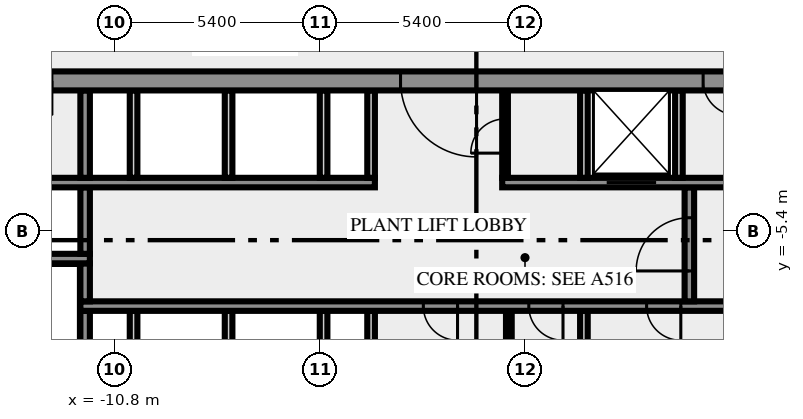
"""IFC4 building model, lengths in metres.
Left out: names, types, materials, properties, quantities, classifications, styles, units other than length and angle.
Written with IfcOpenShell. Run it as: python <this file> out.ifc"""

import sys

from ifc_helpers import new_model, si_unit, direction, frame, frame_2d, origin, place, context, subcontext, project, spatial, rectangle, extrude, element, fill, save


model = new_model("IFC4")
c1 = context("Model", 3, precision=1e-05, world=origin(), true_north=direction((0.0, 1.0)))
c2 = subcontext(c1, "Body", "Model", "MODEL_VIEW")
j1 = project(units=[si_unit("LENGTHUNIT", "METRE"), si_unit("PLANEANGLEUNIT", "RADIAN")], contexts=[c1])
p1 = place(None, origin())
s1 = spatial("IfcSite", under=j1, at=p1, CompositionType="ELEMENT")
p2 = place(p1, origin())
s2 = spatial("IfcBuilding", under=s1, at=p2, CompositionType="ELEMENT")
p3 = place(p2, frame((0.0, 0.0, 301.0)))
s3 = spatial("IfcBuildingStorey", under=s2, at=p3, CompositionType="ELEMENT", Elevation=301.0)
p4 = place(p3, frame((-11.575, -10.5, 0.0), z_axis=(0.0, 0.0, 1.0), x_axis=(0.0, 1.0, 0.0)))
e1 = element("IfcWall", 1, at=p4, inside=s3, PredefinedType="SHEAR", context=c2, shape_type="SweptSolid", body=[
    extrude(rectangle(XDim=3.0, YDim=0.25, at=frame_2d((1.5, 0.0))), origin(), (0.0, 0.0, 1.0), 5.65),
])
for number, where, z_axis, x_axis in (
    (2, (-10.3, -10.5, 0.0), (0.0, 0.0, 1.0), (0.0, 1.0, 0.0)),
    (3, (-7.8, -10.5, 0.0), (0.0, 0.0, 1.0), (0.0, 1.0, 0.0)),
    (4, (-5.3, -10.5, 0.0), (0.0, 0.0, 1.0), (0.0, 1.0, 0.0)),
    (5, (-4.05, -10.5, 0.0), (0.0, 0.0, 1.0), (0.0, 1.0, 0.0)),
):
    element("IfcWall", number, at=place(p3, frame(where, z_axis=z_axis, x_axis=x_axis)), inside=s3, PredefinedType="SOLIDWALL", context=c2, shape_type="SweptSolid", body=[
        extrude(rectangle(XDim=3.0, YDim=0.2, at=frame_2d((1.5, 0.0))), origin(), (0.0, 0.0, 1.0), 5.65),
    ])
p5 = place(p3, frame((-0.425, -10.5, 0.0), z_axis=(0.0, 0.0, 1.0), x_axis=(0.0, 1.0, 0.0)))
e6 = element("IfcWall", 6, at=p5, inside=s3, PredefinedType="PARTITIONING", context=c2, shape_type="SweptSolid", body=[
    extrude(rectangle(XDim=3.0, YDim=0.15, at=frame_2d((1.5, 0.0))), origin(), (0.0, 0.0, 1.0), 5.65),
])
p6 = place(p3, frame((1.55, -10.5, 0.0), z_axis=(0.0, 0.0, 1.0), x_axis=(0.0, 1.0, 0.0)))
e7 = element("IfcWall", 7, at=p6, inside=s3, PredefinedType="SOLIDWALL", context=c2, shape_type="SweptSolid", body=[
    extrude(rectangle(XDim=3.0, YDim=0.2, at=frame_2d((1.5, 0.0))), origin(), (0.0, 0.0, 1.0), 5.65),
])
p7 = place(p3, frame((11.7, -7.375, 0.0), z_axis=(0.0, 0.0, 1.0), x_axis=(-1.0, 0.0, 0.0)))
e8 = element("IfcWall", 8, at=p7, inside=s3, PredefinedType="SHEAR", context=c2, shape_type="SweptSolid", body=[
    extrude(rectangle(XDim=23.4, YDim=0.25, at=frame_2d((11.7, 0.0))), origin(), (0.0, 0.0, 1.0), 5.65),
])
p8 = place(p7, frame((13.475, 0.0, 0.0)))
e9 = element("IfcOpeningElement", 9, at=p8, cuts=e8, PredefinedType="OPENING", context=c2, shape_type="SweptSolid", body=[
    extrude(rectangle(XDim=0.9, YDim=2.1, at=frame_2d((0.45, 1.05))), frame((0.0, 0.135, 0.0), z_axis=(0.0, -1.0, 0.0), x_axis=(1.0, 0.0, 0.0)), (0.0, 0.0, 1.0), 0.27),
])
p9 = place(p7, frame((10.7, 0.0, 0.0)))
e10 = element("IfcOpeningElement", 10, at=p9, cuts=e8, PredefinedType="OPENING", context=c2, shape_type="SweptSolid", body=[
    extrude(rectangle(XDim=0.9, YDim=2.1, at=frame_2d((0.45, 1.05))), frame((0.0, 0.135, 0.0), z_axis=(0.0, -1.0, 0.0), x_axis=(1.0, 0.0, 0.0)), (0.0, 0.0, 1.0), 0.27),
])
p10 = place(p7, frame((7.6, 0.0, 0.0)))
e11 = element("IfcOpeningElement", 11, at=p10, cuts=e8, PredefinedType="OPENING", context=c2, shape_type="SweptSolid", body=[
    extrude(rectangle(XDim=0.9, YDim=2.1, at=frame_2d((0.45, 1.05))), frame((0.0, 0.135, 0.0), z_axis=(0.0, -1.0, 0.0), x_axis=(1.0, 0.0, 0.0)), (0.0, 0.0, 1.0), 0.27),
])
p11 = place(p7, frame((2.338, 0.0, 0.0)))
e12 = element("IfcOpeningElement", 12, at=p11, cuts=e8, PredefinedType="OPENING", context=c2, shape_type="SweptSolid", body=[
    extrude(rectangle(XDim=0.9, YDim=2.1, at=frame_2d((0.45, 1.05))), frame((0.0, 0.135, 0.0), z_axis=(0.0, -1.0, 0.0), x_axis=(1.0, 0.0, 0.0)), (0.0, 0.0, 1.0), 0.27),
])
p12 = place(p3, frame((-11.575, -7.25, 0.0), z_axis=(0.0, 0.0, 1.0), x_axis=(0.0, 1.0, 0.0)))
e13 = element("IfcWall", 13, at=p12, inside=s3, PredefinedType="SHEAR", context=c2, shape_type="SweptSolid", body=[
    extrude(rectangle(XDim=1.0, YDim=0.25, at=frame_2d((0.5, 0.0))), origin(), (0.0, 0.0, 1.0), 5.65),
])
p13 = place(p3, frame((4.325, -7.25, 0.0), z_axis=(0.0, 0.0, 1.0), x_axis=(0.0, 1.0, 0.0)))
e14 = element("IfcWall", 14, at=p13, inside=s3, PredefinedType="SHEAR", context=c2, shape_type="SweptSolid", body=[
    extrude(rectangle(XDim=3.0, YDim=0.25, at=frame_2d((1.5, 0.0))), origin(), (0.0, 0.0, 1.0), 5.65),
])
p14 = place(p13, frame((0.8, 0.0, 0.0)))
e15 = element("IfcOpeningElement", 15, at=p14, cuts=e14, PredefinedType="OPENING", context=c2, shape_type="SweptSolid", body=[
    extrude(rectangle(XDim=1.4, YDim=2.1, at=frame_2d((0.7, 1.05))), frame((0.0, 0.135, 0.0), z_axis=(0.0, -1.0, 0.0), x_axis=(1.0, 0.0, 0.0)), (0.0, 0.0, 1.0), 0.27),
])
p15 = place(p3, frame((-11.45, -6.125, 0.0), z_axis=(0.0, 0.0, 1.0), x_axis=(-1.0, 0.0, 0.0)))
e16 = element("IfcWall", 16, at=p15, inside=s3, PredefinedType="SHEAR", context=c2, shape_type="SweptSolid", body=[
    extrude(rectangle(XDim=8.05, YDim=0.25, at=frame_2d((4.025, 0.0))), origin(), (0.0, 0.0, 1.0), 5.65),
])
p16 = place(p15, frame((6.2, 0.0, 0.0)))
e17 = element("IfcOpeningElement", 17, at=p16, cuts=e16, PredefinedType="OPENING", context=c2, shape_type="SweptSolid", body=[
    extrude(rectangle(XDim=1.8, YDim=2.1, at=frame_2d((0.9, 1.05))), frame((0.0, 0.135, 0.0), z_axis=(0.0, -1.0, 0.0), x_axis=(1.0, 0.0, 0.0)), (0.0, 0.0, 1.0), 0.27),
])
p17 = place(p3, frame((-11.575, -6.0, 0.0), z_axis=(0.0, 0.0, 1.0), x_axis=(0.0, 1.0, 0.0)))
e18 = element("IfcWall", 18, at=p17, inside=s3, PredefinedType="SHEAR", context=c2, shape_type="SweptSolid", body=[
    extrude(rectangle(XDim=1.75, YDim=0.25, at=frame_2d((0.875, 0.0))), origin(), (0.0, 0.0, 1.0), 5.65),
])
p18 = place(p3, frame((-14.35, -4.125, 0.0), z_axis=(0.0, 0.0, 1.0), x_axis=(1.0, 0.0, 0.0)))
e19 = element("IfcWall", 19, at=p18, inside=s3, PredefinedType="SHEAR", context=c2, shape_type="SweptSolid", body=[
    extrude(rectangle(XDim=10.4, YDim=0.25, at=frame_2d((5.2, 0.0))), origin(), (0.0, 0.0, 1.0), 5.65),
])
p19 = place(p3, frame((-0.6, -4.125, 0.0), z_axis=(0.0, 0.0, 1.0), x_axis=(1.0, 0.0, 0.0)))
e20 = element("IfcWall", 20, at=p19, inside=s3, PredefinedType="SHEAR", context=c2, shape_type="SweptSolid", body=[
    extrude(rectangle(XDim=14.95, YDim=0.25, at=frame_2d((7.475, 0.0))), origin(), (0.0, 0.0, 1.0), 5.65),
])
p20 = place(p19, frame((2.75, 0.0, 0.0)))
e21 = element("IfcOpeningElement", 21, at=p20, cuts=e20, PredefinedType="OPENING", context=c2, shape_type="SweptSolid", body=[
    extrude(rectangle(XDim=1.3, YDim=2.1, at=frame_2d((0.65, 1.05))), frame((0.0, 0.135, 0.0), z_axis=(0.0, -1.0, 0.0), x_axis=(1.0, 0.0, 0.0)), (0.0, 0.0, 1.0), 0.27),
])
p21 = place(p3, frame((-11.575, -4.0, 0.0), z_axis=(0.0, 0.0, 1.0), x_axis=(0.0, 1.0, 0.0)))
e22 = element("IfcWall", 22, at=p21, inside=s3, PredefinedType="SHEAR", context=c2, shape_type="SweptSolid", body=[
    extrude(rectangle(XDim=2.3, YDim=0.25, at=frame_2d((1.15, 0.0))), origin(), (0.0, 0.0, 1.0), 5.65),
])
for number, where, z_axis, x_axis in (
    (23, (-10.3, -4.0, 0.0), (0.0, 0.0, 1.0), (0.0, 1.0, 0.0)),
    (24, (-7.8, -4.0, 0.0), (0.0, 0.0, 1.0), (0.0, 1.0, 0.0)),
    (25, (-5.3, -4.0, 0.0), (0.0, 0.0, 1.0), (0.0, 1.0, 0.0)),
    (26, (-4.05, -4.0, 0.0), (0.0, 0.0, 1.0), (0.0, 1.0, 0.0)),
):
    element("IfcWall", number, at=place(p3, frame(where, z_axis=z_axis, x_axis=x_axis)), inside=s3, PredefinedType="SOLIDWALL", context=c2, shape_type="SweptSolid", body=[
        extrude(rectangle(XDim=2.3, YDim=0.2, at=frame_2d((1.15, 0.0))), origin(), (0.0, 0.0, 1.0), 5.65),
    ])
p22 = place(p3, frame((-0.525, -4.0, 0.0), z_axis=(0.0, 0.0, 1.0), x_axis=(0.0, 1.0, 0.0)))
e27 = element("IfcWall", 27, at=p22, inside=s3, PredefinedType="PARTITIONING", context=c2, shape_type="SweptSolid", body=[
    extrude(rectangle(XDim=2.3, YDim=0.15, at=frame_2d((1.15, 0.0))), origin(), (0.0, 0.0, 1.0), 5.65),
])
p23 = place(p22, frame((0.65, 0.0, 0.0)))
e28 = element("IfcOpeningElement", 28, at=p23, cuts=e27, PredefinedType="OPENING", context=c2, shape_type="SweptSolid", body=[
    extrude(rectangle(XDim=0.9, YDim=2.1, at=frame_2d((0.45, 1.05))), frame((0.0, 0.085, 0.0), z_axis=(0.0, -1.0, 0.0), x_axis=(1.0, 0.0, 0.0)), (0.0, 0.0, 1.0), 0.17),
])
for number, where, z_axis, x_axis in (
    (29, (1.55, -4.0, 0.0), (0.0, 0.0, 1.0), (0.0, 1.0, 0.0)),
    (30, (4.05, -4.0, 0.0), (0.0, 0.0, 1.0), (0.0, 1.0, 0.0)),
):
    element("IfcWall", number, at=place(p3, frame(where, z_axis=z_axis, x_axis=x_axis)), inside=s3, PredefinedType="SOLIDWALL", context=c2, shape_type="SweptSolid", body=[
        extrude(rectangle(XDim=2.3, YDim=0.2, at=frame_2d((1.15, 0.0))), origin(), (0.0, 0.0, 1.0), 5.65),
    ])
p24 = place(p3, frame((20.49, -1.45, 0.0), z_axis=(0.0, 0.0, 1.0), x_axis=(-1.0, 0.0, 0.0)))
e31 = element("IfcWall", 31, at=p24, inside=s3, PredefinedType="SHEAR", context=c2, shape_type="SweptSolid", body=[
    extrude(rectangle(XDim=40.98, YDim=0.5, at=frame_2d((20.49, 0.0))), origin(), (0.0, 0.0, 1.0), 5.65),
])
p25 = place(p24, frame((38.14, 0.0, 0.0)))
e32 = element("IfcOpeningElement", 32, at=p25, cuts=e31, PredefinedType="OPENING", context=c2, shape_type="SweptSolid", body=[
    extrude(rectangle(XDim=1.8, YDim=2.1, at=frame_2d((0.9, 1.05))), frame((0.0, 0.26, 0.0), z_axis=(0.0, -1.0, 0.0), x_axis=(1.0, 0.0, 0.0)), (0.0, 0.0, 1.0), 0.52),
])
p26 = place(p24, frame((35.89, 0.0, 0.0)))
e33 = element("IfcOpeningElement", 33, at=p26, cuts=e31, PredefinedType="OPENING", context=c2, shape_type="SweptSolid", body=[
    extrude(rectangle(XDim=0.9, YDim=2.1, at=frame_2d((0.45, 1.05))), frame((0.0, 0.26, 0.0), z_axis=(0.0, -1.0, 0.0), x_axis=(1.0, 0.0, 0.0)), (0.0, 0.0, 1.0), 0.52),
])
p27 = place(p24, frame((32.94, 0.0, 0.0)))
e34 = element("IfcOpeningElement", 34, at=p27, cuts=e31, PredefinedType="OPENING", context=c2, shape_type="SweptSolid", body=[
    extrude(rectangle(XDim=0.9, YDim=2.1, at=frame_2d((0.45, 1.05))), frame((0.0, 0.26, 0.0), z_axis=(0.0, -1.0, 0.0), x_axis=(1.0, 0.0, 0.0)), (0.0, 0.0, 1.0), 0.52),
])
p28 = place(p24, frame((21.765, 0.0, 0.0)))
e35 = element("IfcOpeningElement", 35, at=p28, cuts=e31, PredefinedType="OPENING", context=c2, shape_type="SweptSolid", body=[
    extrude(rectangle(XDim=2.0, YDim=2.1, at=frame_2d((1.0, 1.05))), frame((0.0, 0.26, 0.0), z_axis=(0.0, -1.0, 0.0), x_axis=(1.0, 0.0, 0.0)), (0.0, 0.0, 1.0), 0.52),
])
p29 = place(p24, frame((14.903, 0.0, 0.0)))
e36 = element("IfcOpeningElement", 36, at=p29, cuts=e31, PredefinedType="OPENING", context=c2, shape_type="SweptSolid", body=[
    extrude(rectangle(XDim=0.9, YDim=2.1, at=frame_2d((0.45, 1.05))), frame((0.0, 0.26, 0.0), z_axis=(0.0, -1.0, 0.0), x_axis=(1.0, 0.0, 0.0)), (0.0, 0.0, 1.0), 0.52),
])
p30 = place(p24, frame((12.54, 0.0, 0.0)))
e37 = element("IfcOpeningElement", 37, at=p30, cuts=e31, PredefinedType="OPENING", context=c2, shape_type="SweptSolid", body=[
    extrude(rectangle(XDim=0.9, YDim=2.1, at=frame_2d((0.45, 1.05))), frame((0.0, 0.26, 0.0), z_axis=(0.0, -1.0, 0.0), x_axis=(1.0, 0.0, 0.0)), (0.0, 0.0, 1.0), 0.52),
])
p31 = place(p24, frame((9.877, 0.0, 0.0)))
e38 = element("IfcOpeningElement", 38, at=p31, cuts=e31, PredefinedType="OPENING", context=c2, shape_type="SweptSolid", body=[
    extrude(rectangle(XDim=0.9, YDim=2.1, at=frame_2d((0.45, 1.05))), frame((0.0, 0.26, 0.0), z_axis=(0.0, -1.0, 0.0), x_axis=(1.0, 0.0, 0.0)), (0.0, 0.0, 1.0), 0.52),
])
p32 = place(p24, frame((7.14, 0.0, 0.0)))
e39 = element("IfcOpeningElement", 39, at=p32, cuts=e31, PredefinedType="OPENING", context=c2, shape_type="SweptSolid", body=[
    extrude(rectangle(XDim=0.9, YDim=2.1, at=frame_2d((0.45, 1.05))), frame((0.0, 0.26, 0.0), z_axis=(0.0, -1.0, 0.0), x_axis=(1.0, 0.0, 0.0)), (0.0, 0.0, 1.0), 0.52),
])
p33 = place(p24, frame((5.028, 0.0, 0.0)))
e40 = element("IfcOpeningElement", 40, at=p33, cuts=e31, PredefinedType="OPENING", context=c2, shape_type="SweptSolid", body=[
    extrude(rectangle(XDim=0.8, YDim=2.1, at=frame_2d((0.4, 1.05))), frame((0.0, 0.26, 0.0), z_axis=(0.0, -1.0, 0.0), x_axis=(1.0, 0.0, 0.0)), (0.0, 0.0, 1.0), 0.52),
])
p34 = place(p24, frame((3.452, 0.0, 0.0)))
e41 = element("IfcOpeningElement", 41, at=p34, cuts=e31, PredefinedType="OPENING", context=c2, shape_type="SweptSolid", body=[
    extrude(rectangle(XDim=0.8, YDim=2.1, at=frame_2d((0.4, 1.05))), frame((0.0, 0.26, 0.0), z_axis=(0.0, -1.0, 0.0), x_axis=(1.0, 0.0, 0.0)), (0.0, 0.0, 1.0), 0.52),
])
p35 = place(p24, frame((1.04, 0.0, 0.0)))
e42 = element("IfcOpeningElement", 42, at=p35, cuts=e31, PredefinedType="OPENING", context=c2, shape_type="SweptSolid", body=[
    extrude(rectangle(XDim=1.8, YDim=2.1, at=frame_2d((0.9, 1.05))), frame((0.0, 0.26, 0.0), z_axis=(0.0, -1.0, 0.0), x_axis=(1.0, 0.0, 0.0)), (0.0, 0.0, 1.0), 0.52),
])
p36 = place(p8, origin())
e43 = element("IfcDoor", 43, at=p36, inside=s3, OperationType="SINGLE_SWING_RIGHT", PredefinedType="DOOR", context=c2, shape_type="SweptSolid", body=[
    extrude(rectangle(XDim=0.9, YDim=2.1, at=frame_2d((0.45, 1.05))), frame((0.0, 0.025, 0.0), z_axis=(0.0, -1.0, 0.0), x_axis=(1.0, 0.0, 0.0)), (0.0, 0.0, 1.0), 0.05),
])
fill(e9, e43)
p37 = place(p9, origin())
e44 = element("IfcDoor", 44, at=p37, inside=s3, OperationType="SINGLE_SWING_LEFT", PredefinedType="DOOR", context=c2, shape_type="SweptSolid", body=[
    extrude(rectangle(XDim=0.9, YDim=2.1, at=frame_2d((0.45, 1.05))), frame((0.0, 0.025, 0.0), z_axis=(0.0, -1.0, 0.0), x_axis=(1.0, 0.0, 0.0)), (0.0, 0.0, 1.0), 0.05),
])
fill(e10, e44)
p38 = place(p10, origin())
e45 = element("IfcDoor", 45, at=p38, inside=s3, OperationType="SINGLE_SWING_LEFT", PredefinedType="DOOR", context=c2, shape_type="SweptSolid", body=[
    extrude(rectangle(XDim=0.9, YDim=2.1, at=frame_2d((0.45, 1.05))), frame((0.0, 0.025, 0.0), z_axis=(0.0, -1.0, 0.0), x_axis=(1.0, 0.0, 0.0)), (0.0, 0.0, 1.0), 0.05),
])
fill(e11, e45)
p39 = place(p14, origin())
e46 = element("IfcDoor", 46, at=p39, inside=s3, OperationType="DOUBLE_DOOR_SINGLE_SWING", PredefinedType="DOOR", context=c2, shape_type="SweptSolid", body=[
    extrude(rectangle(XDim=1.4, YDim=2.1, at=frame_2d((0.7, 1.05))), frame((0.0, 0.025, 0.0), z_axis=(0.0, -1.0, 0.0), x_axis=(1.0, 0.0, 0.0)), (0.0, 0.0, 1.0), 0.05),
])
fill(e15, e46)
p40 = place(p20, origin())
e47 = element("IfcDoor", 47, at=p40, inside=s3, OperationType="DOUBLE_DOOR_SLIDING", PredefinedType="DOOR", context=c2, shape_type="SweptSolid", body=[
    extrude(rectangle(XDim=1.3, YDim=2.1, at=frame_2d((0.65, 1.05))), frame((0.0, 0.025, 0.0), z_axis=(0.0, -1.0, 0.0), x_axis=(1.0, 0.0, 0.0)), (0.0, 0.0, 1.0), 0.05),
])
fill(e21, e47)
p41 = place(p23, origin())
e48 = element("IfcDoor", 48, at=p41, inside=s3, OperationType="SINGLE_SWING_LEFT", PredefinedType="DOOR", context=c2, shape_type="SweptSolid", body=[
    extrude(rectangle(XDim=0.9, YDim=2.1, at=frame_2d((0.45, 1.05))), frame((0.0, 0.025, 0.0), z_axis=(0.0, -1.0, 0.0), x_axis=(1.0, 0.0, 0.0)), (0.0, 0.0, 1.0), 0.05),
])
fill(e28, e48)
p42 = place(p28, origin())
e49 = element("IfcDoor", 49, at=p42, inside=s3, OperationType="DOUBLE_DOOR_SINGLE_SWING", PredefinedType="DOOR", context=c2, shape_type="SweptSolid", body=[
    extrude(rectangle(XDim=2.0, YDim=2.1, at=frame_2d((1.0, 1.05))), frame((0.0, 0.025, 0.0), z_axis=(0.0, -1.0, 0.0), x_axis=(1.0, 0.0, 0.0)), (0.0, 0.0, 1.0), 0.05),
])
fill(e35, e49)
p43 = place(p29, origin())
e50 = element("IfcDoor", 50, at=p43, inside=s3, OperationType="SINGLE_SWING_LEFT", PredefinedType="DOOR", context=c2, shape_type="SweptSolid", body=[
    extrude(rectangle(XDim=0.9, YDim=2.1, at=frame_2d((0.45, 1.05))), frame((0.0, 0.025, 0.0), z_axis=(0.0, -1.0, 0.0), x_axis=(1.0, 0.0, 0.0)), (0.0, 0.0, 1.0), 0.05),
])
fill(e36, e50)
save(model, sys.argv[1])
